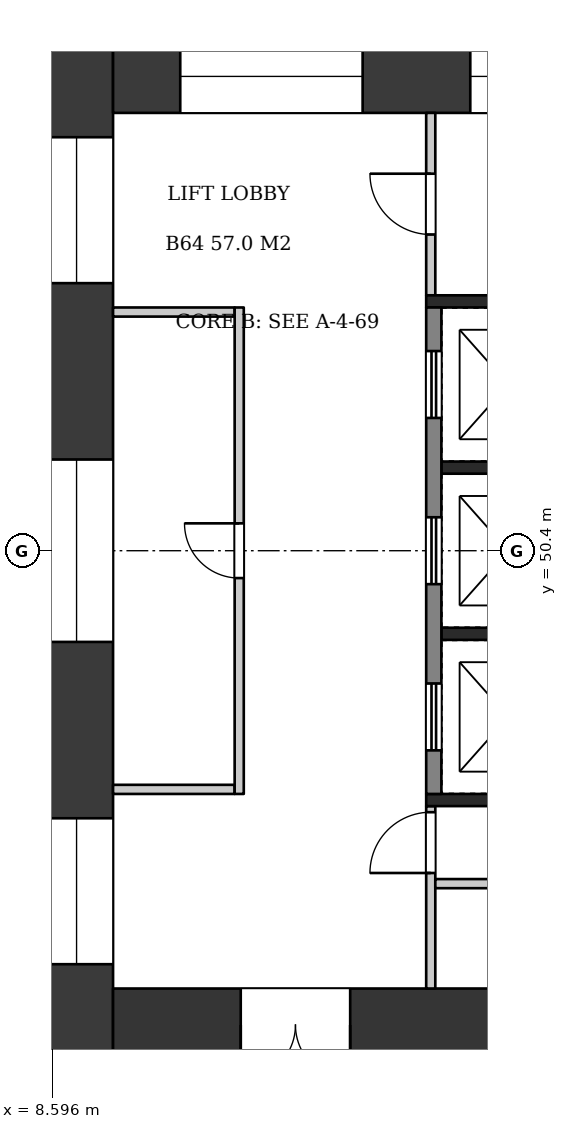
"""IFC4 building model, lengths in metres.
Left out: names, types, materials, properties, quantities, classifications, styles, units other than length and angle.
Written with IfcOpenShell. Run it as: python <this file> out.ifc"""

import sys

from ifc_helpers import new_model, si_unit, direction, frame, frame_2d, origin, place, context, subcontext, project, spatial, rectangle, extrude, element, fill, save


model = new_model("IFC4")
c1 = context("Model", 3, precision=1e-05, world=origin(), true_north=direction((0.0, 1.0)))
c2 = subcontext(c1, "Body", "Model", "MODEL_VIEW")
j1 = project(units=[si_unit("LENGTHUNIT", "METRE"), si_unit("PLANEANGLEUNIT", "RADIAN")], contexts=[c1])
p1 = place(None, origin())
s1 = spatial("IfcSite", under=j1, at=p1, CompositionType="ELEMENT")
p2 = place(p1, origin())
s2 = spatial("IfcBuilding", under=s1, at=p2, CompositionType="ELEMENT")
p3 = place(p2, frame((0.0, 0.0, 245.7)))
s3 = spatial("IfcBuildingStorey", under=s2, at=p3, CompositionType="ELEMENT", Elevation=245.7)
p4 = place(p3, frame((9.0, 58.8, 0.0), z_axis=(0.0, 0.0, 1.0), x_axis=(0.0, -1.0, 0.0)))
e1 = element("IfcWall", 1, at=p4, inside=s3, PredefinedType="SHEAR", context=c2, shape_type="SweptSolid", body=[
    extrude(rectangle(XDim=16.8, YDim=1.2, at=frame_2d((8.4, 0.0))), origin(), (0.0, 0.0, 1.0), 3.22),
])
p5 = place(p4, frame((1.6, 0.0, 0.6)))
e2 = element("IfcOpeningElement", 2, at=p5, cuts=e1, PredefinedType="OPENING", context=c2, shape_type="SweptSolid", body=[
    extrude(rectangle(XDim=2.4, YDim=2.1, at=frame_2d((1.2, 1.05))), frame((0.0, 0.61, 0.0), z_axis=(0.0, -1.0, 0.0), x_axis=(1.0, 0.0, 0.0)), (0.0, 0.0, 1.0), 1.22),
])
p6 = place(p4, frame((6.9, 0.0, 1.6)))
e3 = element("IfcOpeningElement", 3, at=p6, cuts=e1, PredefinedType="OPENING", context=c2, shape_type="SweptSolid", body=[
    extrude(rectangle(XDim=3.0, YDim=1.2, at=frame_2d((1.5, 0.6))), frame((0.0, 0.61, 0.0), z_axis=(0.0, -1.0, 0.0), x_axis=(1.0, 0.0, 0.0)), (0.0, 0.0, 1.0), 1.22),
])
p7 = place(p4, frame((12.8, 0.0, 0.6)))
e4 = element("IfcOpeningElement", 4, at=p7, cuts=e1, PredefinedType="OPENING", context=c2, shape_type="SweptSolid", body=[
    extrude(rectangle(XDim=2.4, YDim=2.1, at=frame_2d((1.2, 1.05))), frame((0.0, 0.61, 0.0), z_axis=(0.0, -1.0, 0.0), x_axis=(1.0, 0.0, 0.0)), (0.0, 0.0, 1.0), 1.22),
])
p8 = place(p3, frame((9.6, 58.2, 0.0), z_axis=(0.0, 0.0, 1.0), x_axis=(1.0, 0.0, 0.0)))
e5 = element("IfcWall", 5, at=p8, inside=s3, PredefinedType="SHEAR", context=c2, shape_type="SweptSolid", body=[
    extrude(rectangle(XDim=14.4, YDim=1.2, at=frame_2d((7.2, 0.0))), origin(), (0.0, 0.0, 1.0), 3.22),
])
p9 = place(p8, frame((1.105, 0.0, 0.6)))
e6 = element("IfcOpeningElement", 6, at=p9, cuts=e5, PredefinedType="OPENING", context=c2, shape_type="SweptSolid", body=[
    extrude(rectangle(XDim=3.0, YDim=2.1, at=frame_2d((1.5, 1.05))), frame((0.0, 0.61, 0.0), z_axis=(0.0, -1.0, 0.0), x_axis=(1.0, 0.0, 0.0)), (0.0, 0.0, 1.0), 1.22),
])
p10 = place(p8, frame((5.875, 0.0, 0.6)))
e7 = element("IfcOpeningElement", 7, at=p10, cuts=e5, PredefinedType="OPENING", context=c2, shape_type="SweptSolid", body=[
    extrude(rectangle(XDim=2.4, YDim=2.1, at=frame_2d((1.2, 1.05))), frame((0.0, 0.61, 0.0), z_axis=(0.0, -1.0, 0.0), x_axis=(1.0, 0.0, 0.0)), (0.0, 0.0, 1.0), 1.22),
])
p11 = place(p8, frame((9.993, 0.0, 0.5)))
e8 = element("IfcOpeningElement", 8, at=p11, cuts=e5, PredefinedType="OPENING", context=c2, shape_type="SweptSolid", body=[
    extrude(rectangle(XDim=1.2, YDim=2.4, at=frame_2d((0.6, 1.2))), frame((0.0, 0.61, 0.0), z_axis=(0.0, -1.0, 0.0), x_axis=(1.0, 0.0, 0.0)), (0.0, 0.0, 1.0), 1.22),
])
p12 = place(p8, frame((12.197, 0.0, 0.5)))
e9 = element("IfcOpeningElement", 9, at=p12, cuts=e5, PredefinedType="OPENING", context=c2, shape_type="SweptSolid", body=[
    extrude(rectangle(XDim=1.2, YDim=2.4, at=frame_2d((0.6, 1.2))), frame((0.0, 0.61, 0.0), z_axis=(0.0, -1.0, 0.0), x_axis=(1.0, 0.0, 0.0)), (0.0, 0.0, 1.0), 1.22),
])
p13 = place(p3, frame((9.6, 42.6, 0.0), z_axis=(0.0, 0.0, 1.0), x_axis=(1.0, 0.0, 0.0)))
e10 = element("IfcWall", 10, at=p13, inside=s3, PredefinedType="SHEAR", context=c2, shape_type="SweptSolid", body=[
    extrude(rectangle(XDim=14.4, YDim=1.2, at=frame_2d((7.2, 0.0))), origin(), (0.0, 0.0, 1.0), 3.22),
])
p14 = place(p13, frame((2.1, 0.0, 0.0)))
e11 = element("IfcOpeningElement", 11, at=p14, cuts=e10, PredefinedType="OPENING", context=c2, shape_type="SweptSolid", body=[
    extrude(rectangle(XDim=1.8, YDim=2.1, at=frame_2d((0.9, 1.05))), frame((0.0, 0.61, 0.0), z_axis=(0.0, -1.0, 0.0), x_axis=(1.0, 0.0, 0.0)), (0.0, 0.0, 1.0), 1.22),
])
for number, where, z_axis, x_axis in (
    (12, (9.6, 54.325, 0.0), (0.0, 0.0, 1.0), (1.0, 0.0, 0.0)),
    (13, (9.6, 46.475, 0.0), (0.0, 0.0, 1.0), (1.0, 0.0, 0.0)),
):
    element("IfcWall", number, at=place(p3, frame(where, z_axis=z_axis, x_axis=x_axis)), inside=s3, PredefinedType="PARTITIONING", context=c2, shape_type="SweptSolid", body=[
        extrude(rectangle(XDim=2.0, YDim=0.15, at=frame_2d((1.0, 0.0))), origin(), (0.0, 0.0, 1.0), 3.22),
    ])
p15 = place(p3, frame((11.675, 54.4, 0.0), z_axis=(0.0, 0.0, 1.0), x_axis=(0.0, -1.0, 0.0)))
e14 = element("IfcWall", 14, at=p15, inside=s3, PredefinedType="PARTITIONING", context=c2, shape_type="SweptSolid", body=[
    extrude(rectangle(XDim=8.0, YDim=0.15, at=frame_2d((4.0, 0.0))), origin(), (0.0, 0.0, 1.0), 3.22),
])
p16 = place(p15, frame((3.55, 0.0, 0.0)))
e15 = element("IfcOpeningElement", 15, at=p16, cuts=e14, PredefinedType="OPENING", context=c2, shape_type="SweptSolid", body=[
    extrude(rectangle(XDim=0.9, YDim=2.1, at=frame_2d((0.45, 1.05))), frame((0.0, 0.085, 0.0), z_axis=(0.0, -1.0, 0.0), x_axis=(1.0, 0.0, 0.0)), (0.0, 0.0, 1.0), 0.17),
])
for number, where, z_axis, x_axis in (
    (16, (15.0, 51.767, 0.0), (0.0, 0.0, 1.0), (1.0, 0.0, 0.0)),
    (17, (15.0, 49.033, 0.0), (0.0, 0.0, 1.0), (1.0, 0.0, 0.0)),
):
    element("IfcWall", number, at=place(p3, frame(where, z_axis=z_axis, x_axis=x_axis)), inside=s3, PredefinedType="SHEAR", context=c2, shape_type="SweptSolid", body=[
        extrude(rectangle(XDim=1.9, YDim=0.2, at=frame_2d((0.95, 0.0))), origin(), (0.0, 0.0, 1.0), 3.22),
    ])
p17 = place(p3, frame((14.875, 54.4, 0.0), z_axis=(0.0, 0.0, 1.0), x_axis=(0.0, -1.0, 0.0)))
e18 = element("IfcWall", 18, at=p17, inside=s3, PredefinedType="SHEAR", context=c2, shape_type="SweptSolid", body=[
    extrude(rectangle(XDim=8.0, YDim=0.25, at=frame_2d((4.0, 0.0))), origin(), (0.0, 0.0, 1.0), 3.22),
])
p18 = place(p17, frame((0.717, 0.0, 0.0)))
e19 = element("IfcOpeningElement", 19, at=p18, cuts=e18, PredefinedType="OPENING", context=c2, shape_type="SweptSolid", body=[
    extrude(rectangle(XDim=1.1, YDim=2.1, at=frame_2d((0.55, 1.05))), frame((0.0, 0.135, 0.0), z_axis=(0.0, -1.0, 0.0), x_axis=(1.0, 0.0, 0.0)), (0.0, 0.0, 1.0), 0.27),
])
p19 = place(p17, frame((3.45, 0.0, 0.0)))
e20 = element("IfcOpeningElement", 20, at=p19, cuts=e18, PredefinedType="OPENING", context=c2, shape_type="SweptSolid", body=[
    extrude(rectangle(XDim=1.1, YDim=2.1, at=frame_2d((0.55, 1.05))), frame((0.0, 0.135, 0.0), z_axis=(0.0, -1.0, 0.0), x_axis=(1.0, 0.0, 0.0)), (0.0, 0.0, 1.0), 0.27),
])
p20 = place(p17, frame((6.183, 0.0, 0.0)))
e21 = element("IfcOpeningElement", 21, at=p20, cuts=e18, PredefinedType="OPENING", context=c2, shape_type="SweptSolid", body=[
    extrude(rectangle(XDim=1.1, YDim=2.1, at=frame_2d((0.55, 1.05))), frame((0.0, 0.135, 0.0), z_axis=(0.0, -1.0, 0.0), x_axis=(1.0, 0.0, 0.0)), (0.0, 0.0, 1.0), 0.27),
])
p21 = place(p3, frame((14.75, 54.5, 0.0), z_axis=(0.0, 0.0, 1.0), x_axis=(1.0, 0.0, 0.0)))
e22 = element("IfcWall", 22, at=p21, inside=s3, PredefinedType="SHEAR", context=c2, shape_type="SweptSolid", body=[
    extrude(rectangle(XDim=2.4, YDim=0.2, at=frame_2d((1.2, 0.0))), origin(), (0.0, 0.0, 1.0), 3.22),
])
p22 = place(p3, frame((14.825, 57.6, 0.0), z_axis=(0.0, 0.0, 1.0), x_axis=(0.0, -1.0, 0.0)))
e23 = element("IfcWall", 23, at=p22, inside=s3, PredefinedType="PARTITIONING", context=c2, shape_type="SweptSolid", body=[
    extrude(rectangle(XDim=3.0, YDim=0.15, at=frame_2d((1.5, 0.0))), origin(), (0.0, 0.0, 1.0), 3.22),
])
p23 = place(p22, frame((1.0, 0.0, 0.0)))
e24 = element("IfcOpeningElement", 24, at=p23, cuts=e23, PredefinedType="OPENING", context=c2, shape_type="SweptSolid", body=[
    extrude(rectangle(XDim=1.0, YDim=2.1, at=frame_2d((0.5, 1.05))), frame((0.0, 0.085, 0.0), z_axis=(0.0, -1.0, 0.0), x_axis=(1.0, 0.0, 0.0)), (0.0, 0.0, 1.0), 0.17),
])
p24 = place(p3, frame((14.75, 46.3, 0.0), z_axis=(0.0, 0.0, 1.0), x_axis=(1.0, 0.0, 0.0)))
e25 = element("IfcWall", 25, at=p24, inside=s3, PredefinedType="SHEAR", context=c2, shape_type="SweptSolid", body=[
    extrude(rectangle(XDim=9.25, YDim=0.2, at=frame_2d((4.625, 0.0))), origin(), (0.0, 0.0, 1.0), 3.22),
])
p25 = place(p3, frame((14.825, 46.2, 0.0), z_axis=(0.0, 0.0, 1.0), x_axis=(0.0, -1.0, 0.0)))
e26 = element("IfcWall", 26, at=p25, inside=s3, PredefinedType="PARTITIONING", context=c2, shape_type="SweptSolid", body=[
    extrude(rectangle(XDim=3.0, YDim=0.15, at=frame_2d((1.5, 0.0))), origin(), (0.0, 0.0, 1.0), 3.22),
])
p26 = place(p25, frame((0.1, 0.0, 0.0)))
e27 = element("IfcOpeningElement", 27, at=p26, cuts=e26, PredefinedType="OPENING", context=c2, shape_type="SweptSolid", body=[
    extrude(rectangle(XDim=1.0, YDim=2.1, at=frame_2d((0.5, 1.05))), frame((0.0, 0.085, 0.0), z_axis=(0.0, -1.0, 0.0), x_axis=(1.0, 0.0, 0.0)), (0.0, 0.0, 1.0), 0.17),
])
p27 = place(p3, frame((14.9, 44.925, 0.0), z_axis=(0.0, 0.0, 1.0), x_axis=(1.0, 0.0, 0.0)))
e28 = element("IfcWall", 28, at=p27, inside=s3, PredefinedType="PARTITIONING", context=c2, shape_type="SweptSolid", body=[
    extrude(rectangle(XDim=9.1, YDim=0.15, at=frame_2d((4.55, 0.0))), origin(), (0.0, 0.0, 1.0), 3.22),
])
p28 = place(p27, frame((4.1, 0.0, 0.0)))
e29 = element("IfcOpeningElement", 29, at=p28, cuts=e28, PredefinedType="OPENING", context=c2, shape_type="SweptSolid", body=[
    extrude(rectangle(XDim=0.9, YDim=2.1, at=frame_2d((0.45, 1.05))), frame((0.0, 0.085, 0.0), z_axis=(0.0, -1.0, 0.0), x_axis=(1.0, 0.0, 0.0)), (0.0, 0.0, 1.0), 0.17),
])
p29 = place(p14, frame((1.8, 0.0, 0.0), z_axis=(0.0, 0.0, 1.0), x_axis=(-1.0, 0.0, 0.0)))
e30 = element("IfcDoor", 30, at=p29, inside=s3, OperationType="DOUBLE_DOOR_SINGLE_SWING", PredefinedType="DOOR", context=c2, shape_type="SweptSolid", body=[
    extrude(rectangle(XDim=1.8, YDim=2.1, at=frame_2d((0.9, 1.05))), frame((0.0, 0.025, 0.0), z_axis=(0.0, -1.0, 0.0), x_axis=(1.0, 0.0, 0.0)), (0.0, 0.0, 1.0), 0.05),
])
fill(e11, e30)
p30 = place(p16, frame((0.9, 0.0, 0.0), z_axis=(0.0, 0.0, 1.0), x_axis=(-1.0, 0.0, 0.0)))
e31 = element("IfcDoor", 31, at=p30, inside=s3, OperationType="SINGLE_SWING_RIGHT", PredefinedType="DOOR", context=c2, shape_type="SweptSolid", body=[
    extrude(rectangle(XDim=0.9, YDim=2.1, at=frame_2d((0.45, 1.05))), frame((0.0, 0.025, 0.0), z_axis=(0.0, -1.0, 0.0), x_axis=(1.0, 0.0, 0.0)), (0.0, 0.0, 1.0), 0.05),
])
fill(e15, e31)
p31 = place(p18, origin())
e32 = element("IfcDoor", 32, at=p31, inside=s3, OperationType="DOUBLE_DOOR_SLIDING", PredefinedType="DOOR", context=c2, shape_type="SweptSolid", body=[
    extrude(rectangle(XDim=1.1, YDim=2.1, at=frame_2d((0.55, 1.05))), frame((0.0, 0.025, 0.0), z_axis=(0.0, -1.0, 0.0), x_axis=(1.0, 0.0, 0.0)), (0.0, 0.0, 1.0), 0.05),
])
fill(e19, e32)
p32 = place(p19, origin())
e33 = element("IfcDoor", 33, at=p32, inside=s3, OperationType="DOUBLE_DOOR_SLIDING", PredefinedType="DOOR", context=c2, shape_type="SweptSolid", body=[
    extrude(rectangle(XDim=1.1, YDim=2.1, at=frame_2d((0.55, 1.05))), frame((0.0, 0.025, 0.0), z_axis=(0.0, -1.0, 0.0), x_axis=(1.0, 0.0, 0.0)), (0.0, 0.0, 1.0), 0.05),
])
fill(e20, e33)
p33 = place(p20, origin())
e34 = element("IfcDoor", 34, at=p33, inside=s3, OperationType="DOUBLE_DOOR_SLIDING", PredefinedType="DOOR", context=c2, shape_type="SweptSolid", body=[
    extrude(rectangle(XDim=1.1, YDim=2.1, at=frame_2d((0.55, 1.05))), frame((0.0, 0.025, 0.0), z_axis=(0.0, -1.0, 0.0), x_axis=(1.0, 0.0, 0.0)), (0.0, 0.0, 1.0), 0.05),
])
fill(e21, e34)
p34 = place(p23, frame((1.0, 0.0, 0.0), z_axis=(0.0, 0.0, 1.0), x_axis=(-1.0, 0.0, 0.0)))
e35 = element("IfcDoor", 35, at=p34, inside=s3, OperationType="SINGLE_SWING_RIGHT", PredefinedType="DOOR", context=c2, shape_type="SweptSolid", body=[
    extrude(rectangle(XDim=1.0, YDim=2.1, at=frame_2d((0.5, 1.05))), frame((0.0, 0.025, 0.0), z_axis=(0.0, -1.0, 0.0), x_axis=(1.0, 0.0, 0.0)), (0.0, 0.0, 1.0), 0.05),
])
fill(e24, e35)
p35 = place(p26, frame((1.0, 0.0, 0.0), z_axis=(0.0, 0.0, 1.0), x_axis=(-1.0, 0.0, 0.0)))
e36 = element("IfcDoor", 36, at=p35, inside=s3, OperationType="SINGLE_SWING_LEFT", PredefinedType="DOOR", context=c2, shape_type="SweptSolid", body=[
    extrude(rectangle(XDim=1.0, YDim=2.1, at=frame_2d((0.5, 1.05))), frame((0.0, 0.025, 0.0), z_axis=(0.0, -1.0, 0.0), x_axis=(1.0, 0.0, 0.0)), (0.0, 0.0, 1.0), 0.05),
])
fill(e27, e36)
p36 = place(p5, origin())
e37 = element("IfcWindow", 37, at=p36, inside=s3, PartitioningType="SINGLE_PANEL", PredefinedType="WINDOW", context=c2, shape_type="SweptSolid", body=[
    extrude(rectangle(XDim=2.4, YDim=2.1, at=frame_2d((1.2, 1.05))), frame((0.0, 0.03, 0.0), z_axis=(0.0, -1.0, 0.0), x_axis=(1.0, 0.0, 0.0)), (0.0, 0.0, 1.0), 0.06),
])
fill(e2, e37)
p37 = place(p6, origin())
e38 = element("IfcWindow", 38, at=p37, inside=s3, PartitioningType="SINGLE_PANEL", PredefinedType="WINDOW", context=c2, shape_type="SweptSolid", body=[
    extrude(rectangle(XDim=3.0, YDim=1.2, at=frame_2d((1.5, 0.6))), frame((0.0, 0.03, 0.0), z_axis=(0.0, -1.0, 0.0), x_axis=(1.0, 0.0, 0.0)), (0.0, 0.0, 1.0), 0.06),
])
fill(e3, e38)
p38 = place(p7, origin())
e39 = element("IfcWindow", 39, at=p38, inside=s3, PartitioningType="SINGLE_PANEL", PredefinedType="WINDOW", context=c2, shape_type="SweptSolid", body=[
    extrude(rectangle(XDim=2.4, YDim=2.1, at=frame_2d((1.2, 1.05))), frame((0.0, 0.03, 0.0), z_axis=(0.0, -1.0, 0.0), x_axis=(1.0, 0.0, 0.0)), (0.0, 0.0, 1.0), 0.06),
])
fill(e4, e39)
p39 = place(p9, origin())
e40 = element("IfcWindow", 40, at=p39, inside=s3, PartitioningType="SINGLE_PANEL", PredefinedType="WINDOW", context=c2, shape_type="SweptSolid", body=[
    extrude(rectangle(XDim=3.0, YDim=2.1, at=frame_2d((1.5, 1.05))), frame((0.0, 0.03, 0.0), z_axis=(0.0, -1.0, 0.0), x_axis=(1.0, 0.0, 0.0)), (0.0, 0.0, 1.0), 0.06),
])
fill(e6, e40)
p40 = place(p10, origin())
e41 = element("IfcWindow", 41, at=p40, inside=s3, PartitioningType="SINGLE_PANEL", PredefinedType="WINDOW", context=c2, shape_type="SweptSolid", body=[
    extrude(rectangle(XDim=2.4, YDim=2.1, at=frame_2d((1.2, 1.05))), frame((0.0, 0.03, 0.0), z_axis=(0.0, -1.0, 0.0), x_axis=(1.0, 0.0, 0.0)), (0.0, 0.0, 1.0), 0.06),
])
fill(e7, e41)
save(model, sys.argv[1])
